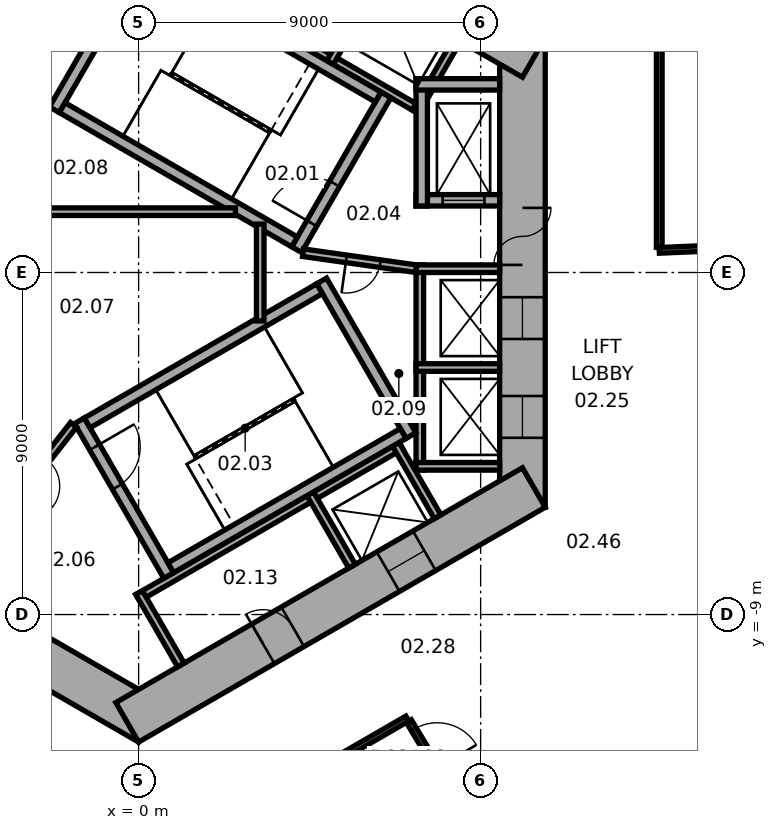
"""IFC4 building model, lengths in metres.
Left out: names, types, materials, properties, quantities, classifications, styles, units other than length and angle.
Written with IfcOpenShell. Run it as: python <this file> out.ifc"""

import sys

from ifc_helpers import new_model, si_unit, direction, frame, frame_2d, origin, place, context, subcontext, project, spatial, rectangle, extrude, element, fill, save


model = new_model("IFC4")
c1 = context("Model", 3, precision=1e-05, world=origin(), true_north=direction((0.0, 1.0)))
c2 = subcontext(c1, "Body", "Model", "MODEL_VIEW")
j1 = project(units=[si_unit("LENGTHUNIT", "METRE"), si_unit("PLANEANGLEUNIT", "RADIAN")], contexts=[c1])
p1 = place(None, origin())
s1 = spatial("IfcSite", under=j1, at=p1, CompositionType="ELEMENT")
p2 = place(p1, origin())
s2 = spatial("IfcBuilding", under=s1, at=p2, CompositionType="ELEMENT")
p3 = place(p2, frame((0.0, 0.0, 13.0)))
s3 = spatial("IfcBuildingStorey", under=s2, at=p3, CompositionType="ELEMENT", Elevation=13.0)
p4 = place(p3, frame((10.1, -6.177, 0.0), z_axis=(0.0, 0.0, 1.0), x_axis=(0.0, 1.0, 0.0)))
e1 = element("IfcWall", 1, at=p4, inside=s3, PredefinedType="SHEAR", context=c2, shape_type="SweptSolid", body=[
    extrude(rectangle(XDim=12.355, YDim=1.2, at=frame_2d((6.177, 0.0))), origin(), (0.0, 0.0, 1.0), 8.0),
])
p5 = place(p4, frame((6.378, 0.0, 0.0)))
e2 = element("IfcOpeningElement", 2, at=p5, cuts=e1, PredefinedType="OPENING", context=c2, shape_type="SweptSolid", body=[
    extrude(rectangle(XDim=1.5, YDim=2.1, at=frame_2d((0.75, 1.05))), frame((0.0, 0.61, 0.0), z_axis=(0.0, -1.0, 0.0), x_axis=(1.0, 0.0, 0.0)), (0.0, 0.0, 1.0), 1.22),
])
p6 = place(p4, frame((1.828, 0.0, 0.0)))
e3 = element("IfcOpeningElement", 3, at=p6, cuts=e1, PredefinedType="OPENING", context=c2, shape_type="SweptSolid", body=[
    extrude(rectangle(XDim=1.1, YDim=2.1, at=frame_2d((0.55, 1.05))), frame((0.0, 0.61, 0.0), z_axis=(0.0, -1.0, 0.0), x_axis=(1.0, 0.0, 0.0)), (0.0, 0.0, 1.0), 1.22),
])
p7 = place(p4, frame((4.427, 0.0, 0.0)))
e4 = element("IfcOpeningElement", 4, at=p7, cuts=e1, PredefinedType="OPENING", context=c2, shape_type="SweptSolid", body=[
    extrude(rectangle(XDim=1.1, YDim=2.1, at=frame_2d((0.55, 1.05))), frame((0.0, 0.61, 0.0), z_axis=(0.0, -1.0, 0.0), x_axis=(1.0, 0.0, 0.0)), (0.0, 0.0, 1.0), 1.22),
])
p8 = place(p3, frame((10.4, 5.658, 0.0), z_axis=(0.0, 0.0, 1.0), x_axis=(-0.866021384402, 0.500006961711, 0.0)))
e5 = element("IfcWall", 5, at=p8, inside=s3, PredefinedType="SHEAR", context=c2, shape_type="SweptSolid", body=[
    extrude(rectangle(XDim=12.355, YDim=1.2, at=frame_2d((6.178, 0.0))), origin(), (0.0, 0.0, 1.0), 8.0),
])
p9 = place(p8, frame((2.728, 0.0, 0.0)))
e6 = element("IfcOpeningElement", 6, at=p9, cuts=e5, PredefinedType="OPENING", context=c2, shape_type="SweptSolid", body=[
    extrude(rectangle(XDim=1.1, YDim=2.1, at=frame_2d((0.55, 1.05))), frame((0.0, 0.61, 0.0), z_axis=(0.0, -1.0, 0.0), x_axis=(1.0, 0.0, 0.0)), (0.0, 0.0, 1.0), 1.22),
])
p10 = place(p8, frame((5.328, 0.0, 0.0)))
e7 = element("IfcOpeningElement", 7, at=p10, cuts=e5, PredefinedType="OPENING", context=c2, shape_type="SweptSolid", body=[
    extrude(rectangle(XDim=1.1, YDim=2.1, at=frame_2d((0.55, 1.05))), frame((0.0, 0.61, 0.0), z_axis=(0.0, -1.0, 0.0), x_axis=(1.0, 0.0, 0.0)), (0.0, 0.0, 1.0), 1.22),
])
p11 = place(p8, frame((7.928, 0.0, 0.0)))
e8 = element("IfcOpeningElement", 8, at=p11, cuts=e5, PredefinedType="OPENING", context=c2, shape_type="SweptSolid", body=[
    extrude(rectangle(XDim=1.1, YDim=2.1, at=frame_2d((0.55, 1.05))), frame((0.0, 0.61, 0.0), z_axis=(0.0, -1.0, 0.0), x_axis=(1.0, 0.0, 0.0)), (0.0, 0.0, 1.0), 1.22),
])
p12 = place(p3, frame((0.3, 11.836, 0.0), z_axis=(0.0, 0.0, 1.0), x_axis=(-0.866021384402, -0.500006961711, 0.0)))
e9 = element("IfcWall", 9, at=p12, inside=s3, PredefinedType="SHEAR", context=c2, shape_type="SweptSolid", body=[
    extrude(rectangle(XDim=12.355, YDim=1.2, at=frame_2d((6.178, 0.0))), origin(), (0.0, 0.0, 1.0), 8.0),
])
p13 = place(p12, frame((6.378, 0.0, 0.0)))
e10 = element("IfcOpeningElement", 10, at=p13, cuts=e9, PredefinedType="OPENING", context=c2, shape_type="SweptSolid", body=[
    extrude(rectangle(XDim=1.5, YDim=2.1, at=frame_2d((0.75, 1.05))), frame((0.0, 0.61, 0.0), z_axis=(0.0, -1.0, 0.0), x_axis=(1.0, 0.0, 0.0)), (0.0, 0.0, 1.0), 1.22),
])
p14 = place(p12, frame((1.828, 0.0, 0.0)))
e11 = element("IfcOpeningElement", 11, at=p14, cuts=e9, PredefinedType="OPENING", context=c2, shape_type="SweptSolid", body=[
    extrude(rectangle(XDim=1.1, YDim=2.1, at=frame_2d((0.55, 1.05))), frame((0.0, 0.61, 0.0), z_axis=(0.0, -1.0, 0.0), x_axis=(1.0, 0.0, 0.0)), (0.0, 0.0, 1.0), 1.22),
])
p15 = place(p3, frame((-10.4, -5.658, 0.0), z_axis=(0.0, 0.0, 1.0), x_axis=(0.866021384402, -0.500006961711, 0.0)))
e12 = element("IfcWall", 12, at=p15, inside=s3, PredefinedType="SHEAR", context=c2, shape_type="SweptSolid", body=[
    extrude(rectangle(XDim=12.355, YDim=1.2, at=frame_2d((6.178, 0.0))), origin(), (0.0, 0.0, 1.0), 8.0),
])
p16 = place(p15, frame((6.378, 0.0, 0.0)))
e13 = element("IfcOpeningElement", 13, at=p16, cuts=e12, PredefinedType="OPENING", context=c2, shape_type="SweptSolid", body=[
    extrude(rectangle(XDim=1.5, YDim=2.1, at=frame_2d((0.75, 1.05))), frame((0.0, 0.61, 0.0), z_axis=(0.0, -1.0, 0.0), x_axis=(1.0, 0.0, 0.0)), (0.0, 0.0, 1.0), 1.22),
])
p17 = place(p15, frame((1.928, 0.0, 0.0)))
e14 = element("IfcOpeningElement", 14, at=p17, cuts=e12, PredefinedType="OPENING", context=c2, shape_type="SweptSolid", body=[
    extrude(rectangle(XDim=0.9, YDim=2.1, at=frame_2d((0.45, 1.05))), frame((0.0, 0.61, 0.0), z_axis=(0.0, -1.0, 0.0), x_axis=(1.0, 0.0, 0.0)), (0.0, 0.0, 1.0), 1.22),
])
p18 = place(p15, frame((4.528, 0.0, 0.0)))
e15 = element("IfcOpeningElement", 15, at=p18, cuts=e12, PredefinedType="OPENING", context=c2, shape_type="SweptSolid", body=[
    extrude(rectangle(XDim=0.9, YDim=2.1, at=frame_2d((0.45, 1.05))), frame((0.0, 0.61, 0.0), z_axis=(0.0, -1.0, 0.0), x_axis=(1.0, 0.0, 0.0)), (0.0, 0.0, 1.0), 1.22),
])
p19 = place(p3, frame((-0.3, -11.836, 0.0), z_axis=(0.0, 0.0, 1.0), x_axis=(0.866021384402, 0.500006961711, 0.0)))
e16 = element("IfcWall", 16, at=p19, inside=s3, PredefinedType="SHEAR", context=c2, shape_type="SweptSolid", body=[
    extrude(rectangle(XDim=12.355, YDim=1.2, at=frame_2d((6.178, 0.0))), origin(), (0.0, 0.0, 1.0), 8.0),
])
p20 = place(p19, frame((4.128, 0.0, 0.0)))
e17 = element("IfcOpeningElement", 17, at=p20, cuts=e16, PredefinedType="OPENING", context=c2, shape_type="SweptSolid", body=[
    extrude(rectangle(XDim=0.9, YDim=2.1, at=frame_2d((0.45, 1.05))), frame((0.0, 0.61, 0.0), z_axis=(0.0, -1.0, 0.0), x_axis=(1.0, 0.0, 0.0)), (0.0, 0.0, 1.0), 1.22),
])
p21 = place(p19, frame((7.928, 0.0, 0.0)))
e18 = element("IfcOpeningElement", 18, at=p21, cuts=e16, PredefinedType="OPENING", context=c2, shape_type="SweptSolid", body=[
    extrude(rectangle(XDim=1.1, YDim=2.1, at=frame_2d((0.55, 1.05))), frame((0.0, 0.61, 0.0), z_axis=(0.0, -1.0, 0.0), x_axis=(1.0, 0.0, 0.0)), (0.0, 0.0, 1.0), 1.22),
])
p22 = place(p3, frame((7.4, -5.2, 0.0), z_axis=(0.0, 0.0, 1.0), x_axis=(0.0, 1.0, 0.0)))
e19 = element("IfcWall", 19, at=p22, inside=s3, PredefinedType="PARTITIONING", context=c2, shape_type="SweptSolid", body=[
    extrude(rectangle(XDim=5.4, YDim=0.2, at=frame_2d((2.7, 0.0))), origin(), (0.0, 0.0, 1.0), 7.7),
])
for number, where, z_axis, x_axis in (
    (20, (7.3, -5.1, 0.0), (0.0, 0.0, 1.0), (1.0, 0.0, 0.0)),
    (21, (7.3, -2.5, 0.0), (0.0, 0.0, 1.0), (1.0, 0.0, 0.0)),
    (22, (7.3, 0.1, 0.0), (0.0, 0.0, 1.0), (1.0, 0.0, 0.0)),
):
    element("IfcWall", number, at=place(p3, frame(where, z_axis=z_axis, x_axis=x_axis)), inside=s3, PredefinedType="PARTITIONING", context=c2, shape_type="SweptSolid", body=[
        extrude(rectangle(XDim=2.2, YDim=0.2, at=frame_2d((1.1, 0.0))), origin(), (0.0, 0.0, 1.0), 7.7),
    ])
p23 = place(p3, frame((7.424, 4.259, 0.0), z_axis=(0.0, 0.0, 1.0), x_axis=(-0.866026010844, 0.49999894854, 0.0)))
e23 = element("IfcWall", 23, at=p23, inside=s3, PredefinedType="PARTITIONING", context=c2, shape_type="SweptSolid", body=[
    extrude(rectangle(XDim=8.0, YDim=0.2, at=frame_2d((4.0, 0.0))), origin(), (0.0, 0.0, 1.0), 7.7),
])
for number, where, z_axis, x_axis in (
    (24, (7.287, 4.222, 0.0), (0.0, 0.0, 1.0), (0.5, 0.866, 0.0)),
    (25, (5.036, 5.522, 0.0), (0.0, 0.0, 1.0), (0.5, 0.866, 0.0)),
):
    element("IfcWall", number, at=place(p3, frame(where, z_axis=z_axis, x_axis=x_axis)), inside=s3, PredefinedType="PARTITIONING", context=c2, shape_type="SweptSolid", body=[
        extrude(rectangle(XDim=2.2, YDim=0.2, at=frame_2d((1.1, 0.0))), origin(), (0.0, 0.0, 1.0), 7.7),
    ])
p24 = place(p3, frame((-0.024, -8.559, 0.0), z_axis=(0.0, 0.0, 1.0), x_axis=(0.866026010844, 0.49999894854, 0.0)))
e26 = element("IfcWall", 26, at=p24, inside=s3, PredefinedType="PARTITIONING", context=c2, shape_type="SweptSolid", body=[
    extrude(rectangle(XDim=8.0, YDim=0.2, at=frame_2d((4.0, 0.0))), origin(), (0.0, 0.0, 1.0), 7.7),
])
for number, where, z_axis, x_axis in (
    (27, (0.013, -8.422, 0.0), (0.0, 0.0, 1.0), (0.5, -0.866, 0.0)),
    (28, (4.516, -5.822, 0.0), (0.0, 0.0, 1.0), (0.5, -0.866, 0.0)),
    (29, (6.768, -4.522, 0.0), (0.0, 0.0, 1.0), (0.5, -0.866, 0.0)),
):
    element("IfcWall", number, at=place(p3, frame(where, z_axis=z_axis, x_axis=x_axis)), inside=s3, PredefinedType="PARTITIONING", context=c2, shape_type="SweptSolid", body=[
        extrude(rectangle(XDim=2.2, YDim=0.2, at=frame_2d((1.1, 0.0))), origin(), (0.0, 0.0, 1.0), 7.7),
    ])
p25 = place(p3, frame((4.158, 0.602, 0.0), z_axis=(0.0, 0.0, 1.0), x_axis=(0.499977259774, 0.866038532462, 0.0)))
e30 = element("IfcWall", 30, at=p25, inside=s3, PredefinedType="SHEAR", context=c2, shape_type="SweptSolid", body=[
    extrude(rectangle(XDim=4.7, YDim=0.3, at=frame_2d((2.35, 0.0))), origin(), (0.0, 0.0, 1.0), 7.7),
])
p26 = place(p25, frame((0.8, 0.0, 0.0)))
e31 = element("IfcOpeningElement", 31, at=p26, cuts=e30, PredefinedType="OPENING", context=c2, shape_type="SweptSolid", body=[
    extrude(rectangle(XDim=1.2, YDim=2.1, at=frame_2d((0.6, 1.05))), frame((0.0, 0.16, 0.0), z_axis=(0.0, -1.0, 0.0), x_axis=(1.0, 0.0, 0.0)), (0.0, 0.0, 1.0), 0.32),
])
p27 = place(p3, frame((-2.216, 4.282, 0.0), z_axis=(0.0, 0.0, 1.0), x_axis=(0.499977259774, 0.866038532462, 0.0)))
e32 = element("IfcWall", 32, at=p27, inside=s3, PredefinedType="SHEAR", context=c2, shape_type="SweptSolid", body=[
    extrude(rectangle(XDim=4.7, YDim=0.3, at=frame_2d((2.35, 0.0))), origin(), (0.0, 0.0, 1.0), 7.7),
])
for number, where, z_axis, x_axis in (
    (33, (4.103, 0.807, 0.0), (0.0, 0.0, 1.0), (-0.866, 0.5, 0.0)),
    (34, (6.303, 4.617, 0.0), (0.0, 0.0, 1.0), (-0.866, 0.5, 0.0)),
):
    element("IfcWall", number, at=place(p3, frame(where, z_axis=z_axis, x_axis=x_axis)), inside=s3, PredefinedType="SHEAR", context=c2, shape_type="SweptSolid", body=[
        extrude(rectangle(XDim=7.06, YDim=0.3, at=frame_2d((3.53, 0.0))), origin(), (0.0, 0.0, 1.0), 7.7),
    ])
p28 = place(p3, frame((-1.558, -3.902, 0.0), z_axis=(0.0, 0.0, 1.0), x_axis=(0.499977259774, -0.866038532462, 0.0)))
e35 = element("IfcWall", 35, at=p28, inside=s3, PredefinedType="SHEAR", context=c2, shape_type="SweptSolid", body=[
    extrude(rectangle(XDim=4.7, YDim=0.3, at=frame_2d((2.35, 0.0))), origin(), (0.0, 0.0, 1.0), 7.7),
])
p29 = place(p28, frame((0.8, 0.0, 0.0)))
e36 = element("IfcOpeningElement", 36, at=p29, cuts=e35, PredefinedType="OPENING", context=c2, shape_type="SweptSolid", body=[
    extrude(rectangle(XDim=1.2, YDim=2.1, at=frame_2d((0.6, 1.05))), frame((0.0, 0.16, 0.0), z_axis=(0.0, -1.0, 0.0), x_axis=(1.0, 0.0, 0.0)), (0.0, 0.0, 1.0), 0.32),
])
p30 = place(p3, frame((4.816, -0.222, 0.0), z_axis=(0.0, 0.0, 1.0), x_axis=(0.499977259774, -0.866038532462, 0.0)))
e37 = element("IfcWall", 37, at=p30, inside=s3, PredefinedType="SHEAR", context=c2, shape_type="SweptSolid", body=[
    extrude(rectangle(XDim=4.7, YDim=0.3, at=frame_2d((2.35, 0.0))), origin(), (0.0, 0.0, 1.0), 7.7),
])
for number, where, z_axis, x_axis in (
    (38, (-1.353, -3.957, 0.0), (0.0, 0.0, 1.0), (0.866, 0.5, 0.0)),
    (39, (0.847, -7.767, 0.0), (0.0, 0.0, 1.0), (0.866, 0.5, 0.0)),
):
    element("IfcWall", number, at=place(p3, frame(where, z_axis=z_axis, x_axis=x_axis)), inside=s3, PredefinedType="SHEAR", context=c2, shape_type="SweptSolid", body=[
        extrude(rectangle(XDim=7.06, YDim=0.3, at=frame_2d((3.53, 0.0))), origin(), (0.0, 0.0, 1.0), 7.7),
    ])
p31 = place(p3, frame((7.3, 1.9, 0.0), z_axis=(0.0, 0.0, 1.0), x_axis=(1.0, 0.0, 0.0)))
e40 = element("IfcWall", 40, at=p31, inside=s3, PredefinedType="SHEAR", context=c2, shape_type="SweptSolid", body=[
    extrude(rectangle(XDim=2.2, YDim=0.3, at=frame_2d((1.1, 0.0))), origin(), (0.0, 0.0, 1.0), 7.7),
])
p32 = place(p31, frame((0.7, 0.0, 0.0)))
e41 = element("IfcOpeningElement", 41, at=p32, cuts=e40, PredefinedType="OPENING", context=c2, shape_type="SweptSolid", body=[
    extrude(rectangle(XDim=1.1, YDim=2.1, at=frame_2d((0.55, 1.05))), frame((0.0, 0.16, 0.0), z_axis=(0.0, -1.0, 0.0), x_axis=(1.0, 0.0, 0.0)), (0.0, 0.0, 1.0), 0.32),
])
p33 = place(p3, frame((7.45, 1.75, 0.0), z_axis=(0.0, 0.0, 1.0), x_axis=(0.0, 1.0, 0.0)))
e42 = element("IfcWall", 42, at=p33, inside=s3, PredefinedType="SHEAR", context=c2, shape_type="SweptSolid", body=[
    extrude(rectangle(XDim=3.35, YDim=0.3, at=frame_2d((1.675, 0.0))), origin(), (0.0, 0.0, 1.0), 7.7),
])
p34 = place(p3, frame((7.3, 4.95, 0.0), z_axis=(0.0, 0.0, 1.0), x_axis=(1.0, 0.0, 0.0)))
e43 = element("IfcWall", 43, at=p34, inside=s3, PredefinedType="SHEAR", context=c2, shape_type="SweptSolid", body=[
    extrude(rectangle(XDim=2.2, YDim=0.3, at=frame_2d((1.1, 0.0))), origin(), (0.0, 0.0, 1.0), 7.7),
])
p35 = place(p3, frame((4.327, 0.521, 0.0), z_axis=(0.0, 0.0, 1.0), x_axis=(0.990124376366, -0.14019172346, 0.0)))
e44 = element("IfcWall", 44, at=p35, inside=s3, PredefinedType="PARTITIONING", context=c2, shape_type="SweptSolid", body=[
    extrude(rectangle(XDim=3.002, YDim=0.2, at=frame_2d((1.501, 0.0))), origin(), (0.0, 0.0, 1.0), 7.7),
])
p36 = place(p35, frame((1.15, 0.0, 0.0)))
e45 = element("IfcOpeningElement", 45, at=p36, cuts=e44, PredefinedType="OPENING", context=c2, shape_type="SweptSolid", body=[
    extrude(rectangle(XDim=0.9, YDim=2.1, at=frame_2d((0.45, 1.05))), frame((0.0, 0.11, 0.0), z_axis=(0.0, -1.0, 0.0), x_axis=(1.0, 0.0, 0.0)), (0.0, 0.0, 1.0), 0.22),
])
p37 = place(p3, frame((-1.712, -4.008, 0.0), z_axis=(0.0, 0.0, 1.0), x_axis=(-0.616549420702, -0.787316208287, 0.0)))
e46 = element("IfcWall", 46, at=p37, inside=s3, PredefinedType="PARTITIONING", context=c2, shape_type="SweptSolid", body=[
    extrude(rectangle(XDim=3.002, YDim=0.2, at=frame_2d((1.501, 0.0))), origin(), (0.0, 0.0, 1.0), 7.7),
])
p38 = place(p37, frame((1.15, 0.0, 0.0)))
e47 = element("IfcOpeningElement", 47, at=p38, cuts=e46, PredefinedType="OPENING", context=c2, shape_type="SweptSolid", body=[
    extrude(rectangle(XDim=0.9, YDim=2.1, at=frame_2d((0.45, 1.05))), frame((0.0, 0.11, 0.0), z_axis=(0.0, -1.0, 0.0), x_axis=(1.0, 0.0, 0.0)), (0.0, 0.0, 1.0), 0.22),
])
p39 = place(p3, frame((-2.72, 1.6, 0.0), z_axis=(0.0, 0.0, 1.0), x_axis=(1.0, 0.0, 0.0)))
e48 = element("IfcWall", 48, at=p39, inside=s3, PredefinedType="PARTITIONING", context=c2, shape_type="SweptSolid", body=[
    extrude(rectangle(XDim=5.269, YDim=0.2, at=frame_2d((2.634, 0.0))), origin(), (0.0, 0.0, 1.0), 7.7),
])
p40 = place(p3, frame((3.2, -1.275, 0.0), z_axis=(0.0, 0.0, 1.0), x_axis=(0.0, 1.0, 0.0)))
e49 = element("IfcWall", 49, at=p40, inside=s3, PredefinedType="PARTITIONING", context=c2, shape_type="SweptSolid", body=[
    extrude(rectangle(XDim=2.549, YDim=0.2, at=frame_2d((1.275, 0.0))), origin(), (0.0, 0.0, 1.0), 7.7),
])
p41 = place(p3, frame((10.924, -18.133, 0.0), z_axis=(0.0, 0.0, 1.0), x_axis=(-0.516035715917, 0.856567066784, 0.0)))
e50 = element("IfcWall", 50, at=p41, inside=s3, PredefinedType="PARTITIONING", context=c2, shape_type="SweptSolid", body=[
    extrude(rectangle(XDim=7.387, YDim=0.15, at=frame_2d((3.693, 0.0))), origin(), (0.0, 0.0, 1.0), 7.7),
])
p42 = place(p41, frame((5.937, 0.0, 0.0)))
e51 = element("IfcOpeningElement", 51, at=p42, cuts=e50, PredefinedType="OPENING", context=c2, shape_type="SweptSolid", body=[
    extrude(rectangle(XDim=1.2, YDim=2.1, at=frame_2d((0.6, 1.05))), frame((0.0, 0.085, 0.0), z_axis=(0.0, -1.0, 0.0), x_axis=(1.0, 0.0, 0.0)), (0.0, 0.0, 1.0), 0.17),
])
p43 = place(p3, frame((0.0, -15.82, 0.0), z_axis=(0.0, 0.0, 1.0), x_axis=(-0.866018019704, 0.500012789385, 0.0)))
e52 = element("IfcWall", 52, at=p43, inside=s3, PredefinedType="PARTITIONING", context=c2, shape_type="SweptSolid", body=[
    extrude(rectangle(XDim=7.327, YDim=0.15, at=frame_2d((3.664, 0.0))), origin(), (0.0, 0.0, 1.0), 7.7),
])
p44 = place(p43, frame((5.527, 0.0, 0.0)))
e53 = element("IfcOpeningElement", 53, at=p44, cuts=e52, PredefinedType="OPENING", context=c2, shape_type="SweptSolid", body=[
    extrude(rectangle(XDim=1.2, YDim=2.1, at=frame_2d((0.6, 1.05))), frame((0.0, 0.085, 0.0), z_axis=(0.0, -1.0, 0.0), x_axis=(1.0, 0.0, 0.0)), (0.0, 0.0, 1.0), 0.17),
])
p45 = place(p3, frame((0.475, -15.545, 0.0), z_axis=(0.0, 0.0, 1.0), x_axis=(0.866021168401, 0.500007335828, 0.0)))
e54 = element("IfcWall", 54, at=p45, inside=s3, PredefinedType="PARTITIONING", context=c2, shape_type="SweptSolid", body=[
    extrude(rectangle(XDim=7.616, YDim=0.15, at=frame_2d((3.808, 0.0))), origin(), (0.0, 0.0, 1.0), 7.7),
])
p46 = place(p3, frame((21.15, 0.899, 0.0), z_axis=(0.0, 0.0, 1.0), x_axis=(-0.999097940345, -0.04246534585, 0.0)))
e55 = element("IfcWall", 55, at=p46, inside=s3, PredefinedType="PARTITIONING", context=c2, shape_type="SweptSolid", body=[
    extrude(rectangle(XDim=7.457, YDim=0.15, at=frame_2d((3.729, 0.0))), origin(), (0.0, 0.0, 1.0), 7.7),
])
p47 = place(p3, frame((13.7, 7.85, 0.0), z_axis=(0.0, 0.0, 1.0), x_axis=(0.0, -1.0, 0.0)))
e56 = element("IfcWall", 56, at=p47, inside=s3, PredefinedType="PARTITIONING", context=c2, shape_type="SweptSolid", body=[
    extrude(rectangle(XDim=7.187, YDim=0.15, at=frame_2d((3.594, 0.0))), origin(), (0.0, 0.0, 1.0), 7.7),
])
p48 = place(p5, origin())
e57 = element("IfcDoor", 57, at=p48, inside=s3, OperationType="DOUBLE_DOOR_SINGLE_SWING", PredefinedType="DOOR", context=c2, shape_type="SweptSolid", body=[
    extrude(rectangle(XDim=1.5, YDim=2.1, at=frame_2d((0.75, 1.05))), frame((0.0, 0.025, 0.0), z_axis=(0.0, -1.0, 0.0), x_axis=(1.0, 0.0, 0.0)), (0.0, 0.0, 1.0), 0.05),
])
fill(e2, e57)
p49 = place(p26, origin())
e58 = element("IfcDoor", 58, at=p49, inside=s3, OperationType="SINGLE_SWING_RIGHT", PredefinedType="DOOR", context=c2, shape_type="SweptSolid", body=[
    extrude(rectangle(XDim=1.2, YDim=2.1, at=frame_2d((0.6, 1.05))), frame((0.0, 0.025, 0.0), z_axis=(0.0, -1.0, 0.0), x_axis=(1.0, 0.0, 0.0)), (0.0, 0.0, 1.0), 0.05),
])
fill(e31, e58)
p50 = place(p29, origin())
e59 = element("IfcDoor", 59, at=p50, inside=s3, OperationType="SINGLE_SWING_RIGHT", PredefinedType="DOOR", context=c2, shape_type="SweptSolid", body=[
    extrude(rectangle(XDim=1.2, YDim=2.1, at=frame_2d((0.6, 1.05))), frame((0.0, 0.025, 0.0), z_axis=(0.0, -1.0, 0.0), x_axis=(1.0, 0.0, 0.0)), (0.0, 0.0, 1.0), 0.05),
])
fill(e36, e59)
p51 = place(p36, origin())
e60 = element("IfcDoor", 60, at=p51, inside=s3, OperationType="SINGLE_SWING_LEFT", PredefinedType="DOOR", context=c2, shape_type="SweptSolid", body=[
    extrude(rectangle(XDim=0.9, YDim=2.1, at=frame_2d((0.45, 1.05))), frame((0.0, 0.025, 0.0), z_axis=(0.0, -1.0, 0.0), x_axis=(1.0, 0.0, 0.0)), (0.0, 0.0, 1.0), 0.05),
])
fill(e45, e60)
p52 = place(p20, origin())
e61 = element("IfcDoor", 61, at=p52, inside=s3, OperationType="SINGLE_SWING_LEFT", PredefinedType="DOOR", context=c2, shape_type="SweptSolid", body=[
    extrude(rectangle(XDim=0.9, YDim=2.1, at=frame_2d((0.45, 1.05))), frame((0.0, 0.025, 0.0), z_axis=(0.0, -1.0, 0.0), x_axis=(1.0, 0.0, 0.0)), (0.0, 0.0, 1.0), 0.05),
])
fill(e17, e61)
p53 = place(p32, origin())
e62 = element("IfcDoor", 62, at=p53, inside=s3, OperationType="DOUBLE_DOOR_SLIDING", PredefinedType="DOOR", context=c2, shape_type="SweptSolid", body=[
    extrude(rectangle(XDim=1.1, YDim=2.1, at=frame_2d((0.55, 1.05))), frame((0.0, 0.025, 0.0), z_axis=(0.0, -1.0, 0.0), x_axis=(1.0, 0.0, 0.0)), (0.0, 0.0, 1.0), 0.05),
])
fill(e41, e62)
p54 = place(p6, origin())
e63 = element("IfcDoor", 63, at=p54, inside=s3, OperationType="DOUBLE_DOOR_SLIDING", PredefinedType="DOOR", context=c2, shape_type="SweptSolid", body=[
    extrude(rectangle(XDim=1.1, YDim=2.1, at=frame_2d((0.55, 1.05))), frame((0.0, 0.025, 0.0), z_axis=(0.0, -1.0, 0.0), x_axis=(1.0, 0.0, 0.0)), (0.0, 0.0, 1.0), 0.05),
])
fill(e3, e63)
p55 = place(p7, origin())
e64 = element("IfcDoor", 64, at=p55, inside=s3, OperationType="DOUBLE_DOOR_SLIDING", PredefinedType="DOOR", context=c2, shape_type="SweptSolid", body=[
    extrude(rectangle(XDim=1.1, YDim=2.1, at=frame_2d((0.55, 1.05))), frame((0.0, 0.025, 0.0), z_axis=(0.0, -1.0, 0.0), x_axis=(1.0, 0.0, 0.0)), (0.0, 0.0, 1.0), 0.05),
])
fill(e4, e64)
p56 = place(p21, origin())
e65 = element("IfcDoor", 65, at=p56, inside=s3, OperationType="DOUBLE_DOOR_SLIDING", PredefinedType="DOOR", context=c2, shape_type="SweptSolid", body=[
    extrude(rectangle(XDim=1.1, YDim=2.1, at=frame_2d((0.55, 1.05))), frame((0.0, 0.025, 0.0), z_axis=(0.0, -1.0, 0.0), x_axis=(1.0, 0.0, 0.0)), (0.0, 0.0, 1.0), 0.05),
])
fill(e18, e65)
p57 = place(p42, origin())
e66 = element("IfcDoor", 66, at=p57, inside=s3, OperationType="SINGLE_SWING_LEFT", PredefinedType="DOOR", context=c2, shape_type="SweptSolid", body=[
    extrude(rectangle(XDim=1.2, YDim=2.1, at=frame_2d((0.6, 1.05))), frame((0.0, 0.025, 0.0), z_axis=(0.0, -1.0, 0.0), x_axis=(1.0, 0.0, 0.0)), (0.0, 0.0, 1.0), 0.05),
])
fill(e51, e66)
save(model, sys.argv[1])
